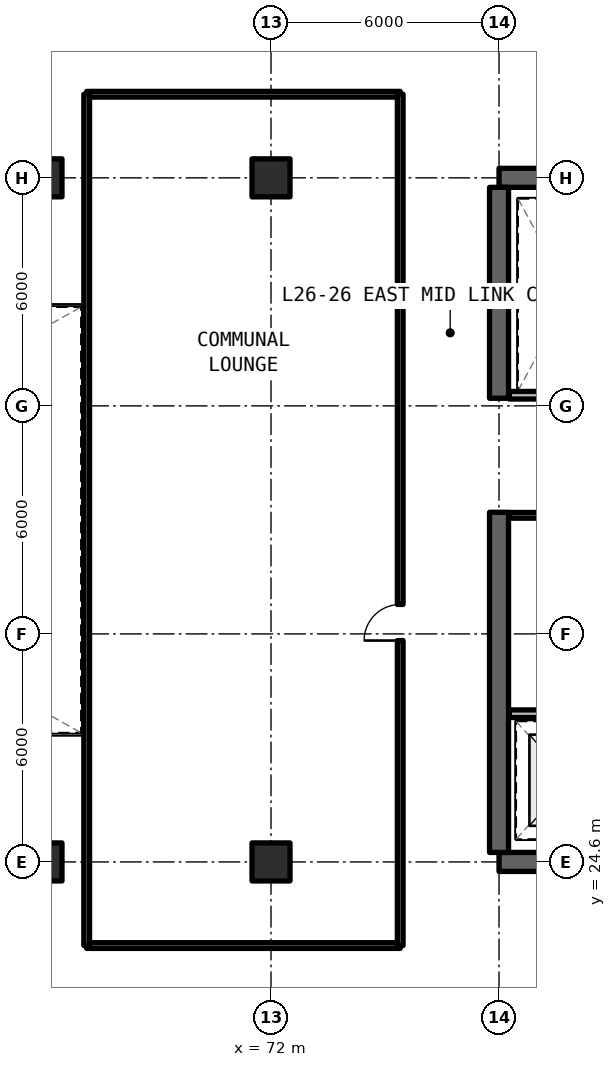
"""IFC4 building model, lengths in metres.
Left out: names, types, materials, properties, quantities, classifications, styles, units other than length and angle.
Written with IfcOpenShell. Run it as: python <this file> out.ifc"""

import sys

from ifc_helpers import new_model, si_unit, direction, frame, frame_2d, origin, origin_2d, place, context, subcontext, project, spatial, rectangle, extrude, element, fill, save


model = new_model("IFC4")
c1 = context("Model", 3, precision=1e-05, world=origin(), true_north=direction((0.0, 1.0)))
c2 = subcontext(c1, "Body", "Model", "MODEL_VIEW")
j1 = project(units=[si_unit("LENGTHUNIT", "METRE"), si_unit("PLANEANGLEUNIT", "RADIAN")], contexts=[c1])
p1 = place(None, origin())
s1 = spatial("IfcSite", under=j1, at=p1, CompositionType="ELEMENT")
p2 = place(p1, origin())
s2 = spatial("IfcBuilding", under=s1, at=p2, CompositionType="ELEMENT")
p3 = place(p2, frame((0.0, 0.0, 95.37)))
s3 = spatial("IfcBuildingStorey", under=s2, at=p3, CompositionType="ELEMENT", Elevation=95.37)
for number, where, z_axis, x_axis in (
    (1, (78.0, 24.6, 0.0), (0.0, 0.0, 1.0), (1.0, 0.0, 0.0)),
    (2, (90.0, 42.6, 0.0), (0.0, 0.0, 1.0), (-1.0, 0.0, 0.0)),
):
    element("IfcWall", number, at=place(p3, frame(where, z_axis=z_axis, x_axis=x_axis)), inside=s3, PredefinedType="SHEAR", context=c2, shape_type="SweptSolid", body=[
        extrude(rectangle(XDim=12.0, YDim=0.5, at=frame_2d((6.0, 0.0))), origin(), (0.0, 0.0, 1.0), 3.3),
    ])
p4 = place(p3, frame((78.0, 24.85, 0.0), z_axis=(0.0, 0.0, 1.0), x_axis=(0.0, 1.0, 0.0)))
e3 = element("IfcWall", 3, at=p4, inside=s3, PredefinedType="SHEAR", context=c2, shape_type="SweptSolid", body=[
    extrude(rectangle(XDim=8.95, YDim=0.5, at=frame_2d((4.475, 0.0))), origin(), (0.0, 0.0, 1.0), 3.3),
])
p5 = place(p3, frame((78.0, 36.8, 0.0), z_axis=(0.0, 0.0, 1.0), x_axis=(0.0, 1.0, 0.0)))
e4 = element("IfcWall", 4, at=p5, inside=s3, PredefinedType="SHEAR", context=c2, shape_type="SweptSolid", body=[
    extrude(rectangle(XDim=5.55, YDim=0.5, at=frame_2d((2.775, 0.0))), origin(), (0.0, 0.0, 1.0), 3.3),
])
for number, where, z_axis, x_axis in (
    (5, (66.0, 24.6, 0.0), (0.0, 0.0, 1.0), (1.0, 0.0, 0.0)),
    (6, (66.0, 42.6, 0.0), (0.0, 0.0, 1.0), (1.0, 0.0, 0.0)),
    (7, (72.0, 24.6, 0.0), (0.0, 0.0, 1.0), (1.0, 0.0, 0.0)),
    (8, (72.0, 42.6, 0.0), (0.0, 0.0, 1.0), (1.0, 0.0, 0.0)),
):
    element("IfcColumn", number, at=place(p3, frame(where, z_axis=z_axis, x_axis=x_axis)), inside=s3, PredefinedType="COLUMN", context=c2, shape_type="SweptSolid", body=[
        extrude(rectangle(XDim=1.0, YDim=1.0, at=origin_2d()), origin(), (0.0, 0.0, 1.0), 3.3),
    ])
p6 = place(p3, frame((78.27, 28.5, 0.0), z_axis=(0.0, 0.0, 1.0), x_axis=(1.0, 0.0, 0.0)))
e9 = element("IfcWall", 9, at=p6, inside=s3, PredefinedType="SOLIDWALL", context=c2, shape_type="SweptSolid", body=[
    extrude(rectangle(XDim=7.51, YDim=0.2, at=frame_2d((3.755, 0.0))), origin(), (0.0, 0.0, 1.0), 2.35),
])
p7 = place(p6, frame((3.53, 0.0, 0.0)))
e10 = element("IfcOpeningElement", 10, at=p7, cuts=e9, PredefinedType="OPENING", context=c2, shape_type="SweptSolid", body=[
    extrude(rectangle(XDim=1.0, YDim=2.15, at=frame_2d((0.5, 1.075))), frame((0.0, 0.11, 0.0), z_axis=(0.0, -1.0, 0.0), x_axis=(1.0, 0.0, 0.0)), (0.0, 0.0, 1.0), 0.22),
])
p8 = place(p3, frame((78.27, 33.72, 0.0), z_axis=(0.0, 0.0, 1.0), x_axis=(1.0, 0.0, 0.0)))
e11 = element("IfcWall", 11, at=p8, inside=s3, PredefinedType="SOLIDWALL", context=c2, shape_type="SweptSolid", body=[
    extrude(rectangle(XDim=3.05, YDim=0.15, at=frame_2d((1.525, 0.0))), origin(), (0.0, 0.0, 1.0), 2.35),
])
p9 = place(p3, frame((78.27, 36.88, 0.0), z_axis=(0.0, 0.0, 1.0), x_axis=(1.0, 0.0, 0.0)))
e12 = element("IfcWall", 12, at=p9, inside=s3, PredefinedType="SOLIDWALL", context=c2, shape_type="SweptSolid", body=[
    extrude(rectangle(XDim=3.05, YDim=0.2, at=frame_2d((1.525, 0.0))), origin(), (0.0, 0.0, 1.0), 2.35),
])
for number, where, z_axis, x_axis in (
    (13, (67.15, 22.4, 0.0), (0.0, 0.0, 1.0), (1.0, 0.0, 0.0)),
    (14, (67.15, 44.8, 0.0), (0.0, 0.0, 1.0), (1.0, 0.0, 0.0)),
):
    element("IfcWall", number, at=place(p3, frame(where, z_axis=z_axis, x_axis=x_axis)), inside=s3, PredefinedType="SOLIDWALL", context=c2, shape_type="SweptSolid", body=[
        extrude(rectangle(XDim=8.25, YDim=0.15, at=frame_2d((4.125, 0.0))), origin(), (0.0, 0.0, 1.0), 2.35),
    ])
p10 = place(p3, frame((67.15, 22.4, 0.0), z_axis=(0.0, 0.0, 1.0), x_axis=(0.0, 1.0, 0.0)))
e15 = element("IfcWall", 15, at=p10, inside=s3, PredefinedType="SOLIDWALL", context=c2, shape_type="SweptSolid", body=[
    extrude(rectangle(XDim=22.4, YDim=0.15, at=frame_2d((11.2, 0.0))), origin(), (0.0, 0.0, 1.0), 2.35),
])
p11 = place(p3, frame((75.4, 22.4, 0.0), z_axis=(0.0, 0.0, 1.0), x_axis=(0.0, 1.0, 0.0)))
e16 = element("IfcWall", 16, at=p11, inside=s3, PredefinedType="SOLIDWALL", context=c2, shape_type="SweptSolid", body=[
    extrude(rectangle(XDim=22.4, YDim=0.15, at=frame_2d((11.2, 0.0))), origin(), (0.0, 0.0, 1.0), 2.35),
])
p12 = place(p11, frame((8.025, 0.0, 0.0)))
e17 = element("IfcOpeningElement", 17, at=p12, cuts=e16, PredefinedType="OPENING", context=c2, shape_type="SweptSolid", body=[
    extrude(rectangle(XDim=0.95, YDim=2.15, at=frame_2d((0.475, 1.075))), frame((0.0, 0.085, 0.0), z_axis=(0.0, -1.0, 0.0), x_axis=(1.0, 0.0, 0.0)), (0.0, 0.0, 1.0), 0.17),
])
p13 = place(p12, origin())
e18 = element("IfcDoor", 18, at=p13, inside=s3, OperationType="SINGLE_SWING_LEFT", PredefinedType="DOOR", context=c2, shape_type="SweptSolid", body=[
    extrude(rectangle(XDim=0.95, YDim=2.15, at=frame_2d((0.475, 1.075))), frame((0.0, 0.025, 0.0), z_axis=(0.0, -1.0, 0.0), x_axis=(1.0, 0.0, 0.0)), (0.0, 0.0, 1.0), 0.05),
])
fill(e17, e18)
save(model, sys.argv[1])
